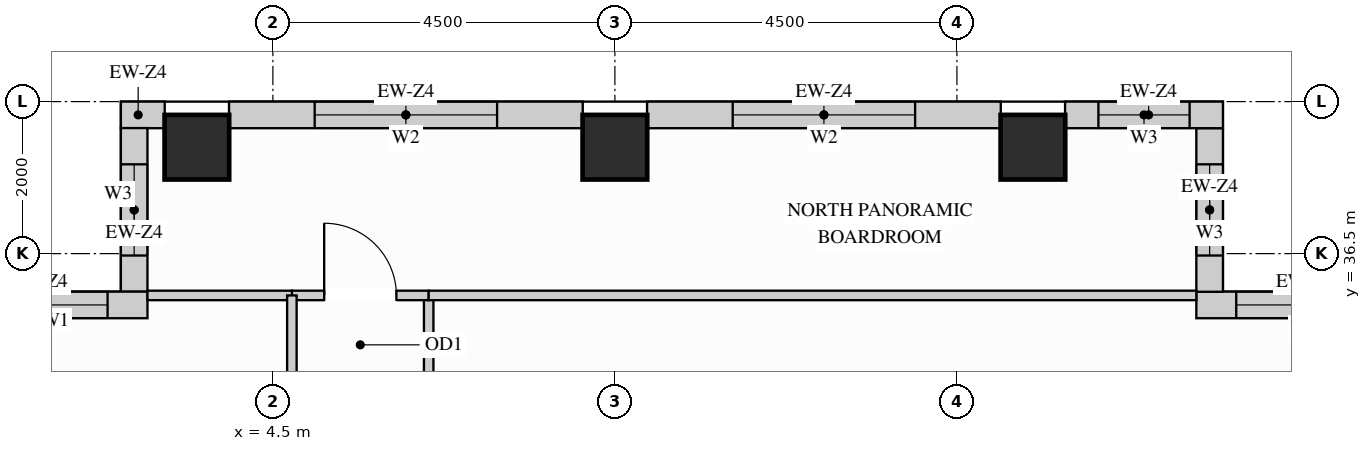
"""IFC4 building model, lengths in metres.
Left out: names, types, materials, properties, quantities, classifications, styles, units other than length and angle.
Written with IfcOpenShell. Run it as: python <this file> out.ifc"""

import sys

from ifc_helpers import new_model, si_unit, direction, frame, frame_2d, origin, origin_2d, place, context, subcontext, project, spatial, rectangle, extrude, source, transform, mapped, element, fill, save


model = new_model("IFC4")
c1 = context("Model", 3, precision=1e-05, world=origin(), true_north=direction((0.0, 1.0)))
c2 = subcontext(c1, "Body", "Model", "MODEL_VIEW")
j1 = project(units=[si_unit("LENGTHUNIT", "METRE"), si_unit("PLANEANGLEUNIT", "RADIAN")], contexts=[c1])
p1 = place(None, origin())
s1 = spatial("IfcSite", under=j1, at=p1, CompositionType="ELEMENT")
p2 = place(p1, origin())
s2 = spatial("IfcBuilding", under=s1, at=p2, CompositionType="ELEMENT")
p3 = place(p2, frame((0.0, 0.0, 230.4)))
s3 = spatial("IfcBuildingStorey", under=s2, at=p3, CompositionType="ELEMENT", Elevation=230.4)
m1 = source(origin(), c2, "Body", "SweptSolid", [
    extrude(rectangle(XDim=0.85, YDim=0.85, at=origin_2d()), origin(), (0.0, 0.0, 1.0), 3.4),
])
for number, where, z_axis, x_axis in (
    (1, (14.5, 37.9, 0.0), (0.0, 0.0, 1.0), (1.0, 0.0, 0.0)),
    (2, (3.5, 37.9, 0.0), (0.0, 0.0, 1.0), (1.0, 0.0, 0.0)),
    (3, (9.0, 37.9, 0.0), (0.0, 0.0, 1.0), (1.0, 0.0, 0.0)),
):
    element("IfcColumn", number, at=place(p3, frame(where, z_axis=z_axis, x_axis=x_axis)), inside=s3, PredefinedType="COLUMN", context=c2, shape_type="MappedRepresentation", body=[
        mapped(m1, transform((0.0, 0.0, 0.0), x_axis=(1.0, 0.0, 0.0), y_axis=(0.0, 1.0, 0.0), z_axis=(0.0, 0.0, 1.0))),
    ])
p4 = place(p3, frame((19.5, 35.825, 0.0), z_axis=(0.0, 0.0, 1.0), x_axis=(-1.0, 0.0, 0.0)))
e4 = element("IfcWall", 4, at=p4, inside=s3, PredefinedType="SOLIDWALL", context=c2, shape_type="SweptSolid", body=[
    extrude(rectangle(XDim=2.85, YDim=0.35, at=frame_2d((1.425, 0.0))), origin(), (0.0, 0.0, 1.0), 3.385),
])
p5 = place(p4, frame((0.525, 0.0, 0.78)))
e5 = element("IfcOpeningElement", 5, at=p5, cuts=e4, PredefinedType="OPENING", context=c2, shape_type="SweptSolid", body=[
    extrude(rectangle(XDim=1.8, YDim=2.1, at=frame_2d((0.9, 1.05))), frame((0.0, 0.185, 0.0), z_axis=(0.0, -1.0, 0.0), x_axis=(1.0, 0.0, 0.0)), (0.0, 0.0, 1.0), 0.37),
])
p6 = place(p3, frame((16.825, 35.998, 0.0), z_axis=(0.0, 0.0, 1.0), x_axis=(0.0, 1.0, 0.0)))
e6 = element("IfcWall", 6, at=p6, inside=s3, PredefinedType="SOLIDWALL", context=c2, shape_type="SweptSolid", body=[
    extrude(rectangle(XDim=2.154, YDim=0.35, at=frame_2d((1.077, 0.0))), origin(), (0.0, 0.0, 1.0), 3.385),
])
p7 = place(p6, frame((0.477, 0.0, 0.78)))
e7 = element("IfcOpeningElement", 7, at=p7, cuts=e6, PredefinedType="OPENING", context=c2, shape_type="SweptSolid", body=[
    extrude(rectangle(XDim=1.2, YDim=2.1, at=frame_2d((0.6, 1.05))), frame((0.0, 0.185, 0.0), z_axis=(0.0, -1.0, 0.0), x_axis=(1.0, 0.0, 0.0)), (0.0, 0.0, 1.0), 0.37),
])
p8 = place(p3, frame((17.0, 38.325, 0.0), z_axis=(0.0, 0.0, 1.0), x_axis=(-1.0, 0.0, 0.0)))
e8 = element("IfcWall", 8, at=p8, inside=s3, PredefinedType="SOLIDWALL", context=c2, shape_type="SweptSolid", body=[
    extrude(rectangle(XDim=2.077, YDim=0.35, at=frame_2d((1.039, 0.0))), origin(), (0.0, 0.0, 1.0), 3.385),
])
p9 = place(p8, frame((0.438, 0.0, 0.78)))
e9 = element("IfcOpeningElement", 9, at=p9, cuts=e8, PredefinedType="OPENING", context=c2, shape_type="SweptSolid", body=[
    extrude(rectangle(XDim=1.2, YDim=2.1, at=frame_2d((0.6, 1.05))), frame((0.0, 0.185, 0.0), z_axis=(0.0, -1.0, 0.0), x_axis=(1.0, 0.0, 0.0)), (0.0, 0.0, 1.0), 0.37),
])
p10 = place(p3, frame((14.077, 38.325, 0.0), z_axis=(0.0, 0.0, 1.0), x_axis=(-1.0, 0.0, 0.0)))
e10 = element("IfcWall", 10, at=p10, inside=s3, PredefinedType="SOLIDWALL", context=c2, shape_type="SweptSolid", body=[
    extrude(rectangle(XDim=4.654, YDim=0.35, at=frame_2d((2.327, 0.0))), origin(), (0.0, 0.0, 1.0), 3.385),
])
p11 = place(p10, frame((1.127, 0.0, 0.78)))
e11 = element("IfcOpeningElement", 11, at=p11, cuts=e10, PredefinedType="OPENING", context=c2, shape_type="SweptSolid", body=[
    extrude(rectangle(XDim=2.4, YDim=2.1, at=frame_2d((1.2, 1.05))), frame((0.0, 0.185, 0.0), z_axis=(0.0, -1.0, 0.0), x_axis=(1.0, 0.0, 0.0)), (0.0, 0.0, 1.0), 0.37),
])
p12 = place(p3, frame((8.577, 38.325, 0.0), z_axis=(0.0, 0.0, 1.0), x_axis=(-1.0, 0.0, 0.0)))
e12 = element("IfcWall", 12, at=p12, inside=s3, PredefinedType="SOLIDWALL", context=c2, shape_type="SweptSolid", body=[
    extrude(rectangle(XDim=4.654, YDim=0.35, at=frame_2d((2.327, 0.0))), origin(), (0.0, 0.0, 1.0), 3.385),
])
p13 = place(p12, frame((1.127, 0.0, 0.78)))
e13 = element("IfcOpeningElement", 13, at=p13, cuts=e12, PredefinedType="OPENING", context=c2, shape_type="SweptSolid", body=[
    extrude(rectangle(XDim=2.4, YDim=2.1, at=frame_2d((1.2, 1.05))), frame((0.0, 0.185, 0.0), z_axis=(0.0, -1.0, 0.0), x_axis=(1.0, 0.0, 0.0)), (0.0, 0.0, 1.0), 0.37),
])
m2 = source(origin(), c2, "Body", "SweptSolid", [
    extrude(rectangle(XDim=0.577, YDim=0.35, at=frame_2d((0.289, 0.0))), origin(), (0.0, 0.0, 1.0), 3.385),
])
p14 = place(p3, frame((3.077, 38.325, 0.0), z_axis=(0.0, 0.0, 1.0), x_axis=(-1.0, 0.0, 0.0)))
e14 = element("IfcWall", 14, at=p14, inside=s3, PredefinedType="SOLIDWALL", context=c2, shape_type="MappedRepresentation", body=[
    mapped(m2, transform((0.0, 0.0, 0.0), x_axis=(1.0, 0.0, 0.0), y_axis=(0.0, 1.0, 0.0), z_axis=(0.0, 0.0, 1.0))),
])
p15 = place(p3, frame((2.675, 38.152, 0.0), z_axis=(0.0, 0.0, 1.0), x_axis=(0.0, -1.0, 0.0)))
e15 = element("IfcWall", 15, at=p15, inside=s3, PredefinedType="SOLIDWALL", context=c2, shape_type="SweptSolid", body=[
    extrude(rectangle(XDim=2.154, YDim=0.35, at=frame_2d((1.077, 0.0))), origin(), (0.0, 0.0, 1.0), 3.385),
])
p16 = place(p15, frame((0.477, 0.0, 0.78)))
e16 = element("IfcOpeningElement", 16, at=p16, cuts=e15, PredefinedType="OPENING", context=c2, shape_type="SweptSolid", body=[
    extrude(rectangle(XDim=1.2, YDim=2.1, at=frame_2d((0.6, 1.05))), frame((0.0, 0.185, 0.0), z_axis=(0.0, -1.0, 0.0), x_axis=(1.0, 0.0, 0.0)), (0.0, 0.0, 1.0), 0.37),
])
p17 = place(p3, frame((2.85, 35.825, 0.0), z_axis=(0.0, 0.0, 1.0), x_axis=(-1.0, 0.0, 0.0)))
e17 = element("IfcWall", 17, at=p17, inside=s3, PredefinedType="SOLIDWALL", context=c2, shape_type="SweptSolid", body=[
    extrude(rectangle(XDim=2.85, YDim=0.35, at=frame_2d((1.425, 0.0))), origin(), (0.0, 0.0, 1.0), 3.385),
])
p18 = place(p17, frame((0.525, 0.0, 0.78)))
e18 = element("IfcOpeningElement", 18, at=p18, cuts=e17, PredefinedType="OPENING", context=c2, shape_type="SweptSolid", body=[
    extrude(rectangle(XDim=1.8, YDim=2.1, at=frame_2d((0.9, 1.05))), frame((0.0, 0.185, 0.0), z_axis=(0.0, -1.0, 0.0), x_axis=(1.0, 0.0, 0.0)), (0.0, 0.0, 1.0), 0.37),
])
p19 = place(p3, frame((6.55, 32.85, 0.0), z_axis=(0.0, 0.0, 1.0), x_axis=(0.0, 1.0, 0.0)))
e19 = element("IfcWall", 19, at=p19, inside=s3, PredefinedType="PARTITIONING", context=c2, shape_type="SweptSolid", body=[
    extrude(rectangle(XDim=3.1, YDim=0.125, at=frame_2d((1.55, 0.0))), origin(), (0.0, 0.0, 1.0), 3.385),
])
p20 = place(p19, frame((1.075, 0.0, 0.0)))
e20 = element("IfcOpeningElement", 20, at=p20, cuts=e19, PredefinedType="OPENING", context=c2, shape_type="SweptSolid", body=[
    extrude(rectangle(XDim=0.95, YDim=2.15, at=frame_2d((0.475, 1.075))), frame((0.0, 0.073, 0.0), z_axis=(0.0, -1.0, 0.0), x_axis=(1.0, 0.0, 0.0)), (0.0, 0.0, 1.0), 0.145),
])
p21 = place(p3, frame((4.75, 35.95, 0.0), z_axis=(0.0, 0.0, 1.0), x_axis=(1.0, 0.0, 0.0)))
e21 = element("IfcWall", 21, at=p21, inside=s3, PredefinedType="PARTITIONING", context=c2, shape_type="SweptSolid", body=[
    extrude(rectangle(XDim=1.8, YDim=0.125, at=frame_2d((0.9, 0.0))), origin(), (0.0, 0.0, 1.0), 3.385),
])
p22 = place(p21, frame((0.425, 0.0, 0.0)))
e22 = element("IfcOpeningElement", 22, at=p22, cuts=e21, PredefinedType="OPENING", context=c2, shape_type="SweptSolid", body=[
    extrude(rectangle(XDim=0.95, YDim=2.15, at=frame_2d((0.475, 1.075))), frame((0.0, 0.073, 0.0), z_axis=(0.0, -1.0, 0.0), x_axis=(1.0, 0.0, 0.0)), (0.0, 0.0, 1.0), 0.145),
])
m3 = source(origin(), c2, "Body", "SweptSolid", [
    extrude(rectangle(XDim=10.1, YDim=0.125, at=frame_2d((5.05, 0.0))), origin(), (0.0, 0.0, 1.0), 3.385),
])
p23 = place(p3, frame((6.55, 35.95, 0.0), z_axis=(0.0, 0.0, 1.0), x_axis=(1.0, 0.0, 0.0)))
e23 = element("IfcWall", 23, at=p23, inside=s3, PredefinedType="PARTITIONING", context=c2, shape_type="MappedRepresentation", body=[
    mapped(m3, transform((0.0, 0.0, 0.0), x_axis=(1.0, 0.0, 0.0), y_axis=(0.0, 1.0, 0.0), z_axis=(0.0, 0.0, 1.0))),
])
m4 = source(origin(), c2, "Body", "SweptSolid", [
    extrude(rectangle(XDim=1.9, YDim=0.125, at=frame_2d((0.95, 0.0))), origin(), (0.0, 0.0, 1.0), 3.385),
])
p24 = place(p3, frame((2.85, 35.95, 0.0), z_axis=(0.0, 0.0, 1.0), x_axis=(1.0, 0.0, 0.0)))
e24 = element("IfcWall", 24, at=p24, inside=s3, PredefinedType="PARTITIONING", context=c2, shape_type="MappedRepresentation", body=[
    mapped(m4, transform((0.0, 0.0, 0.0), x_axis=(1.0, 0.0, 0.0), y_axis=(0.0, 1.0, 0.0), z_axis=(0.0, 0.0, 1.0))),
])
p25 = place(p3, frame((4.75, 32.85, 0.0), z_axis=(0.0, 0.0, 1.0), x_axis=(0.0, 1.0, 0.0)))
e25 = element("IfcWall", 25, at=p25, inside=s3, PredefinedType="PARTITIONING", context=c2, shape_type="SweptSolid", body=[
    extrude(rectangle(XDim=3.1, YDim=0.125, at=frame_2d((1.55, 0.0))), origin(), (0.0, 0.0, 1.0), 3.385),
])
p26 = place(p25, frame((1.075, 0.0, 0.0)))
e26 = element("IfcOpeningElement", 26, at=p26, cuts=e25, PredefinedType="OPENING", context=c2, shape_type="SweptSolid", body=[
    extrude(rectangle(XDim=0.95, YDim=2.15, at=frame_2d((0.475, 1.075))), frame((0.0, 0.073, 0.0), z_axis=(0.0, -1.0, 0.0), x_axis=(1.0, 0.0, 0.0)), (0.0, 0.0, 1.0), 0.145),
])
m5 = source(origin(), c2, "Body", "SweptSolid", [
    extrude(rectangle(XDim=0.95, YDim=2.15, at=frame_2d((0.475, 1.075))), frame((0.0, 0.025, 0.0), z_axis=(0.0, -1.0, 0.0), x_axis=(1.0, 0.0, 0.0)), (0.0, 0.0, 1.0), 0.05),
])
p27 = place(p22, origin())
e27 = element("IfcDoor", 27, at=p27, inside=s3, OperationType="SINGLE_SWING_LEFT", PredefinedType="DOOR", context=c2, shape_type="MappedRepresentation", body=[
    mapped(m5, transform((0.0, 0.0, 0.0), x_axis=(1.0, 0.0, 0.0), y_axis=(0.0, 1.0, 0.0), z_axis=(0.0, 0.0, 1.0))),
])
fill(e22, e27)
m6 = source(origin(), c2, "Body", "SweptSolid", [
    extrude(rectangle(XDim=1.8, YDim=2.1, at=frame_2d((0.9, 1.05))), frame((0.0, 0.03, 0.0), z_axis=(0.0, -1.0, 0.0), x_axis=(1.0, 0.0, 0.0)), (0.0, 0.0, 1.0), 0.06),
])
p28 = place(p5, origin())
e28 = element("IfcWindow", 28, at=p28, inside=s3, PartitioningType="SINGLE_PANEL", PredefinedType="WINDOW", context=c2, shape_type="MappedRepresentation", body=[
    mapped(m6, transform((0.0, 0.0, 0.0), x_axis=(1.0, 0.0, 0.0), y_axis=(0.0, 1.0, 0.0), z_axis=(0.0, 0.0, 1.0))),
])
fill(e5, e28)
p29 = place(p18, origin())
e29 = element("IfcWindow", 29, at=p29, inside=s3, PartitioningType="SINGLE_PANEL", PredefinedType="WINDOW", context=c2, shape_type="MappedRepresentation", body=[
    mapped(m6, transform((0.0, 0.0, 0.0), x_axis=(1.0, 0.0, 0.0), y_axis=(0.0, 1.0, 0.0), z_axis=(0.0, 0.0, 1.0))),
])
fill(e18, e29)
m7 = source(origin(), c2, "Body", "SweptSolid", [
    extrude(rectangle(XDim=2.4, YDim=2.1, at=frame_2d((1.2, 1.05))), frame((0.0, 0.03, 0.0), z_axis=(0.0, -1.0, 0.0), x_axis=(1.0, 0.0, 0.0)), (0.0, 0.0, 1.0), 0.06),
])
p30 = place(p11, origin())
e30 = element("IfcWindow", 30, at=p30, inside=s3, PartitioningType="SINGLE_PANEL", PredefinedType="WINDOW", context=c2, shape_type="MappedRepresentation", body=[
    mapped(m7, transform((0.0, 0.0, 0.0), x_axis=(1.0, 0.0, 0.0), y_axis=(0.0, 1.0, 0.0), z_axis=(0.0, 0.0, 1.0))),
])
fill(e11, e30)
p31 = place(p13, origin())
e31 = element("IfcWindow", 31, at=p31, inside=s3, PartitioningType="SINGLE_PANEL", PredefinedType="WINDOW", context=c2, shape_type="MappedRepresentation", body=[
    mapped(m7, transform((0.0, 0.0, 0.0), x_axis=(1.0, 0.0, 0.0), y_axis=(0.0, 1.0, 0.0), z_axis=(0.0, 0.0, 1.0))),
])
fill(e13, e31)
m8 = source(origin(), c2, "Body", "SweptSolid", [
    extrude(rectangle(XDim=1.2, YDim=2.1, at=frame_2d((0.6, 1.05))), frame((0.0, 0.03, 0.0), z_axis=(0.0, -1.0, 0.0), x_axis=(1.0, 0.0, 0.0)), (0.0, 0.0, 1.0), 0.06),
])
p32 = place(p7, origin())
e32 = element("IfcWindow", 32, at=p32, inside=s3, PartitioningType="SINGLE_PANEL", PredefinedType="WINDOW", context=c2, shape_type="MappedRepresentation", body=[
    mapped(m8, transform((0.0, 0.0, 0.0), x_axis=(1.0, 0.0, 0.0), y_axis=(0.0, 1.0, 0.0), z_axis=(0.0, 0.0, 1.0))),
])
fill(e7, e32)
p33 = place(p9, origin())
e33 = element("IfcWindow", 33, at=p33, inside=s3, PartitioningType="SINGLE_PANEL", PredefinedType="WINDOW", context=c2, shape_type="MappedRepresentation", body=[
    mapped(m8, transform((0.0, 0.0, 0.0), x_axis=(1.0, 0.0, 0.0), y_axis=(0.0, 1.0, 0.0), z_axis=(0.0, 0.0, 1.0))),
])
fill(e9, e33)
p34 = place(p16, origin())
e34 = element("IfcWindow", 34, at=p34, inside=s3, PartitioningType="SINGLE_PANEL", PredefinedType="WINDOW", context=c2, shape_type="MappedRepresentation", body=[
    mapped(m8, transform((0.0, 0.0, 0.0), x_axis=(1.0, 0.0, 0.0), y_axis=(0.0, 1.0, 0.0), z_axis=(0.0, 0.0, 1.0))),
])
fill(e16, e34)
save(model, sys.argv[1])
